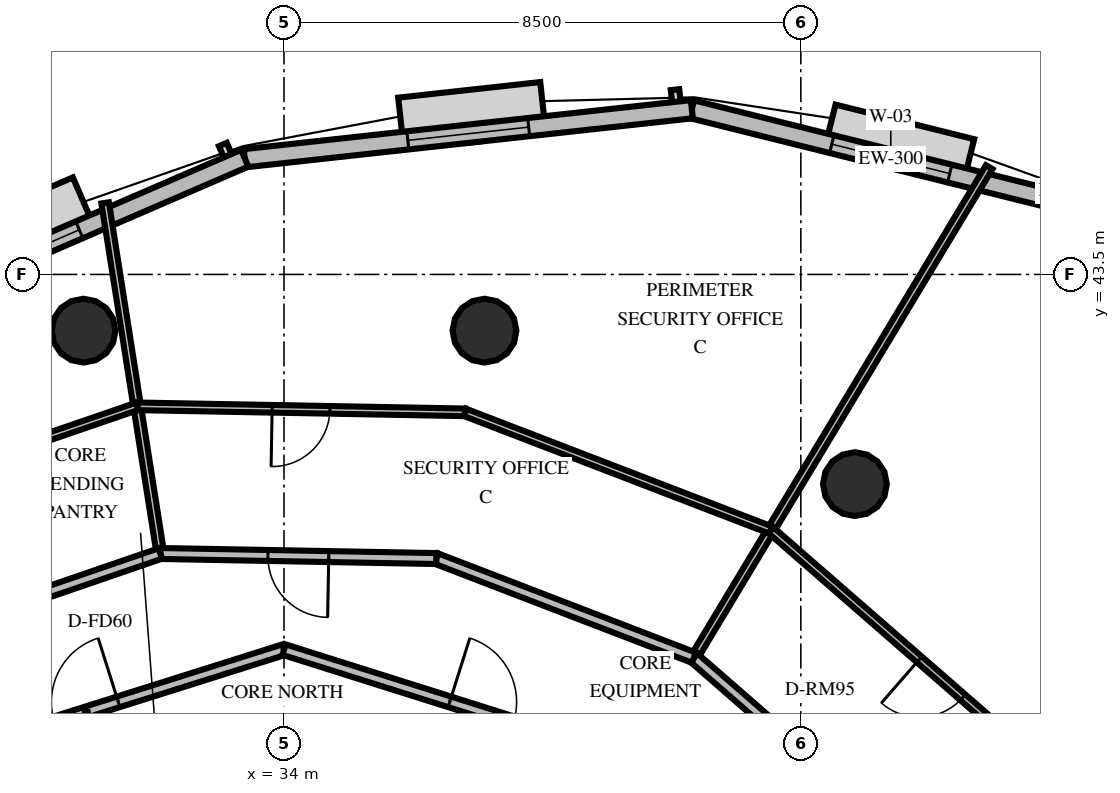
"""IFC4 building model, lengths in metres.
Left out: names, types, materials, properties, quantities, classifications, styles, units other than length and angle.
Written with IfcOpenShell. Run it as: python <this file> out.ifc"""

import sys

from ifc_helpers import new_model, si_unit, direction, frame, frame_2d, origin, origin_2d, place, context, subcontext, project, spatial, rectangle, circle, extrude, element, fill, save


model = new_model("IFC4")
c1 = context("Model", 3, precision=1e-05, world=origin(), true_north=direction((0.0, 1.0)))
c2 = subcontext(c1, "Body", "Model", "MODEL_VIEW")
j1 = project(units=[si_unit("LENGTHUNIT", "METRE"), si_unit("PLANEANGLEUNIT", "RADIAN")], contexts=[c1])
p1 = place(None, origin())
s1 = spatial("IfcSite", under=j1, at=p1, CompositionType="ELEMENT")
p2 = place(p1, origin())
s2 = spatial("IfcBuilding", under=s1, at=p2, CompositionType="ELEMENT")
p3 = place(p2, frame((0.0, 0.0, 195.2)))
s3 = spatial("IfcBuildingStorey", under=s2, at=p3, CompositionType="ELEMENT", Elevation=195.2)
for number, where, z_axis, x_axis in (
    (1, (43.389, 40.052, 0.0), (0.0, 0.0, 1.0), (1.0, 0.0, 0.0)),
    (2, (37.297, 42.575, 0.0), (0.0, 0.0, 1.0), (1.0, 0.0, 0.0)),
    (3, (30.703, 42.575, 0.0), (0.0, 0.0, 1.0), (1.0, 0.0, 0.0)),
):
    element("IfcColumn", number, at=place(p3, frame(where, z_axis=z_axis, x_axis=x_axis)), inside=s3, PredefinedType="COLUMN", context=c2, shape_type="SweptSolid", body=[
        extrude(circle(Radius=0.525, at=origin_2d()), origin(), (0.0, 0.0, 1.0), 3.6),
    ])
p4 = place(p3, frame((47.252, 44.584, 0.0), z_axis=(0.0, 0.0, 1.0), x_axis=(-0.970265866101, 0.242041626748, 0.0)))
e4 = element("IfcWall", 4, at=p4, inside=s3, PredefinedType="SOLIDWALL", context=c2, shape_type="SweptSolid", body=[
    extrude(rectangle(XDim=6.745, YDim=0.3, at=frame_2d((3.373, 0.0))), origin(), (0.0, 0.0, 1.0), 2.66),
])
p5 = place(p4, frame((2.373, 0.0, 0.8)))
e5 = element("IfcOpeningElement", 5, at=p5, cuts=e4, PredefinedType="OPENING", context=c2, shape_type="SweptSolid", body=[
    extrude(rectangle(XDim=2.0, YDim=1.85, at=frame_2d((1.0, 0.925))), frame((0.0, 0.16, 0.0), z_axis=(0.0, -1.0, 0.0), x_axis=(1.0, 0.0, 0.0)), (0.0, 0.0, 1.0), 0.32),
])
p6 = place(p3, frame((40.708, 46.217, 0.0), z_axis=(0.0, 0.0, 1.0), x_axis=(-0.994048036748, -0.108942648383, 0.0)))
e6 = element("IfcWall", 6, at=p6, inside=s3, PredefinedType="SOLIDWALL", context=c2, shape_type="SweptSolid", body=[
    extrude(rectangle(XDim=7.397, YDim=0.3, at=frame_2d((3.699, 0.0))), origin(), (0.0, 0.0, 1.0), 2.66),
])
p7 = place(p6, frame((2.699, 0.0, 0.8)))
e7 = element("IfcOpeningElement", 7, at=p7, cuts=e6, PredefinedType="OPENING", context=c2, shape_type="SweptSolid", body=[
    extrude(rectangle(XDim=2.0, YDim=1.85, at=frame_2d((1.0, 0.925))), frame((0.0, 0.16, 0.0), z_axis=(0.0, -1.0, 0.0), x_axis=(1.0, 0.0, 0.0)), (0.0, 0.0, 1.0), 0.32),
])
p8 = place(p3, frame((33.354, 45.411, 0.0), z_axis=(0.0, 0.0, 1.0), x_axis=(-0.917811240331, -0.397017036311, 0.0)))
e8 = element("IfcWall", 8, at=p8, inside=s3, PredefinedType="SOLIDWALL", context=c2, shape_type="SweptSolid", body=[
    extrude(rectangle(XDim=7.927, YDim=0.3, at=frame_2d((3.964, 0.0))), origin(), (0.0, 0.0, 1.0), 2.66),
])
p9 = place(p8, frame((2.964, 0.0, 0.8)))
e9 = element("IfcOpeningElement", 9, at=p9, cuts=e8, PredefinedType="OPENING", context=c2, shape_type="SweptSolid", body=[
    extrude(rectangle(XDim=2.0, YDim=1.85, at=frame_2d((1.0, 0.925))), frame((0.0, 0.16, 0.0), z_axis=(0.0, -1.0, 0.0), x_axis=(1.0, 0.0, 0.0)), (0.0, 0.0, 1.0), 0.32),
])
p10 = place(p3, frame((27.5, 35.28, 0.0), z_axis=(0.0, 0.0, 1.0), x_axis=(0.953691418528, 0.300786765376, 0.0)))
e10 = element("IfcWall", 10, at=p10, inside=s3, PredefinedType="PARTITIONING", context=c2, shape_type="SweptSolid", body=[
    extrude(rectangle(XDim=6.816, YDim=0.18, at=frame_2d((3.408, 0.0))), origin(), (0.0, 0.0, 1.0), 2.46),
])
p11 = place(p10, frame((2.858, 0.0, 0.0)))
e11 = element("IfcOpeningElement", 11, at=p11, cuts=e10, PredefinedType="OPENING", context=c2, shape_type="SweptSolid", body=[
    extrude(rectangle(XDim=1.1, YDim=2.15, at=frame_2d((0.55, 1.075))), frame((0.0, 0.1, 0.0), z_axis=(0.0, -1.0, 0.0), x_axis=(1.0, 0.0, 0.0)), (0.0, 0.0, 1.0), 0.2),
])
p12 = place(p3, frame((34.0, 37.33, 0.0), z_axis=(0.0, 0.0, 1.0), x_axis=(0.953691418528, -0.300786765376, 0.0)))
e12 = element("IfcWall", 12, at=p12, inside=s3, PredefinedType="PARTITIONING", context=c2, shape_type="SweptSolid", body=[
    extrude(rectangle(XDim=6.816, YDim=0.18, at=frame_2d((3.408, 0.0))), origin(), (0.0, 0.0, 1.0), 2.46),
])
p13 = place(p12, frame((2.858, 0.0, 0.0)))
e13 = element("IfcOpeningElement", 13, at=p13, cuts=e12, PredefinedType="OPENING", context=c2, shape_type="SweptSolid", body=[
    extrude(rectangle(XDim=1.1, YDim=2.15, at=frame_2d((0.55, 1.075))), frame((0.0, 0.1, 0.0), z_axis=(0.0, -1.0, 0.0), x_axis=(1.0, 0.0, 0.0)), (0.0, 0.0, 1.0), 0.2),
])
p14 = place(p3, frame((40.741, 37.197, 0.0), z_axis=(0.0, 0.0, 1.0), x_axis=(0.515795335876, 0.856711836903, 0.0)))
e14 = element("IfcWall", 14, at=p14, inside=s3, PredefinedType="PARTITIONING", context=c2, shape_type="SweptSolid", body=[
    extrude(rectangle(XDim=9.417, YDim=0.125, at=frame_2d((4.708, 0.0))), origin(), (0.0, 0.0, 1.0), 2.46),
])
p15 = place(p3, frame((44.165, 34.216, 0.0), z_axis=(0.0, 0.0, 1.0), x_axis=(-0.754153769573, 0.656697869525, 0.0)))
e15 = element("IfcWall", 15, at=p15, inside=s3, PredefinedType="PARTITIONING", context=c2, shape_type="SweptSolid", body=[
    extrude(rectangle(XDim=4.539, YDim=0.18, at=frame_2d((2.27, 0.0))), origin(), (0.0, 0.0, 1.0), 2.46),
])
p16 = place(p15, frame((0.96, 0.0, 0.0)))
e16 = element("IfcOpeningElement", 16, at=p16, cuts=e15, PredefinedType="OPENING", context=c2, shape_type="SweptSolid", body=[
    extrude(rectangle(XDim=1.0, YDim=2.15, at=frame_2d((0.5, 1.075))), frame((0.0, 0.1, 0.0), z_axis=(0.0, -1.0, 0.0), x_axis=(1.0, 0.0, 0.0)), (0.0, 0.0, 1.0), 0.2),
])
p17 = place(p3, frame((46.07, 35.757, 0.0), z_axis=(0.0, 0.0, 1.0), x_axis=(-0.754140206691, 0.656713444854, 0.0)))
e17 = element("IfcWall", 17, at=p17, inside=s3, PredefinedType="PARTITIONING", context=c2, shape_type="SweptSolid", body=[
    extrude(rectangle(XDim=5.39, YDim=0.125, at=frame_2d((2.695, 0.0))), origin(), (0.0, 0.0, 1.0), 2.46),
])
p18 = place(p17, frame((1.2, 0.0, 0.0)))
e18 = element("IfcOpeningElement", 18, at=p18, cuts=e17, PredefinedType="OPENING", context=c2, shape_type="SweptSolid", body=[
    extrude(rectangle(XDim=0.95, YDim=2.15, at=frame_2d((0.475, 1.075))), frame((0.0, 0.073, 0.0), z_axis=(0.0, -1.0, 0.0), x_axis=(1.0, 0.0, 0.0)), (0.0, 0.0, 1.0), 0.145),
])
p19 = place(p3, frame((31.967, 38.911, 0.0), z_axis=(0.0, 0.0, 1.0), x_axis=(-0.155588850642, 0.987821901739, 0.0)))
e19 = element("IfcWall", 19, at=p19, inside=s3, PredefinedType="PARTITIONING", context=c2, shape_type="SweptSolid", body=[
    extrude(rectangle(XDim=5.837, YDim=0.125, at=frame_2d((2.918, 0.0))), origin(), (0.0, 0.0, 1.0), 2.46),
])
p20 = place(p3, frame((40.741, 37.197, 0.0), z_axis=(0.0, 0.0, 1.0), x_axis=(-0.93326379198, 0.359191723984, 0.0)))
e20 = element("IfcWall", 20, at=p20, inside=s3, PredefinedType="PARTITIONING", context=c2, shape_type="SweptSolid", body=[
    extrude(rectangle(XDim=4.539, YDim=0.18, at=frame_2d((2.27, 0.0))), origin(), (0.0, 0.0, 1.0), 2.46),
])
p21 = place(p3, frame((36.505, 38.828, 0.0), z_axis=(0.0, 0.0, 1.0), x_axis=(-0.999831787945, 0.018341096331, 0.0)))
e21 = element("IfcWall", 21, at=p21, inside=s3, PredefinedType="PARTITIONING", context=c2, shape_type="SweptSolid", body=[
    extrude(rectangle(XDim=4.539, YDim=0.18, at=frame_2d((2.27, 0.0))), origin(), (0.0, 0.0, 1.0), 2.46),
])
p22 = place(p21, frame((1.77, 0.0, 0.0)))
e22 = element("IfcOpeningElement", 22, at=p22, cuts=e21, PredefinedType="OPENING", context=c2, shape_type="SweptSolid", body=[
    extrude(rectangle(XDim=1.0, YDim=2.15, at=frame_2d((0.5, 1.075))), frame((0.0, 0.1, 0.0), z_axis=(0.0, -1.0, 0.0), x_axis=(1.0, 0.0, 0.0)), (0.0, 0.0, 1.0), 0.2),
])
p23 = place(p3, frame((42.005, 39.296, 0.0), z_axis=(0.0, 0.0, 1.0), x_axis=(-0.933263863739, 0.359191537539, 0.0)))
e23 = element("IfcWall", 23, at=p23, inside=s3, PredefinedType="PARTITIONING", context=c2, shape_type="SweptSolid", body=[
    extrude(rectangle(XDim=5.39, YDim=0.125, at=frame_2d((2.695, 0.0))), origin(), (0.0, 0.0, 1.0), 2.46),
])
p24 = place(p3, frame((36.975, 41.232, 0.0), z_axis=(0.0, 0.0, 1.0), x_axis=(-0.999832559092, 0.018299010323, 0.0)))
e24 = element("IfcWall", 24, at=p24, inside=s3, PredefinedType="PARTITIONING", context=c2, shape_type="SweptSolid", body=[
    extrude(rectangle(XDim=5.39, YDim=0.125, at=frame_2d((2.695, 0.0))), origin(), (0.0, 0.0, 1.0), 2.46),
])
p25 = place(p24, frame((2.22, 0.0, 0.0)))
e25 = element("IfcOpeningElement", 25, at=p25, cuts=e24, PredefinedType="OPENING", context=c2, shape_type="SweptSolid", body=[
    extrude(rectangle(XDim=0.95, YDim=2.15, at=frame_2d((0.475, 1.075))), frame((0.0, 0.073, 0.0), z_axis=(0.0, -1.0, 0.0), x_axis=(1.0, 0.0, 0.0)), (0.0, 0.0, 1.0), 0.145),
])
p26 = place(p3, frame((31.967, 38.911, 0.0), z_axis=(0.0, 0.0, 1.0), x_axis=(-0.945799700753, -0.324750559747, 0.0)))
e26 = element("IfcWall", 26, at=p26, inside=s3, PredefinedType="PARTITIONING", context=c2, shape_type="SweptSolid", body=[
    extrude(rectangle(XDim=4.539, YDim=0.18, at=frame_2d((2.27, 0.0))), origin(), (0.0, 0.0, 1.0), 2.46),
])
p27 = place(p26, frame((2.579, 0.0, 0.0)))
e27 = element("IfcOpeningElement", 27, at=p27, cuts=e26, PredefinedType="OPENING", context=c2, shape_type="SweptSolid", body=[
    extrude(rectangle(XDim=1.0, YDim=2.15, at=frame_2d((0.5, 1.075))), frame((0.0, 0.1, 0.0), z_axis=(0.0, -1.0, 0.0), x_axis=(1.0, 0.0, 0.0)), (0.0, 0.0, 1.0), 0.2),
])
p28 = place(p3, frame((31.585, 41.331, 0.0), z_axis=(0.0, 0.0, 1.0), x_axis=(-0.945809679089, -0.324721497504, 0.0)))
e28 = element("IfcWall", 28, at=p28, inside=s3, PredefinedType="PARTITIONING", context=c2, shape_type="SweptSolid", body=[
    extrude(rectangle(XDim=5.39, YDim=0.125, at=frame_2d((2.695, 0.0))), origin(), (0.0, 0.0, 1.0), 2.46),
])
p29 = place(p28, frame((3.24, 0.0, 0.0)))
e29 = element("IfcOpeningElement", 29, at=p29, cuts=e28, PredefinedType="OPENING", context=c2, shape_type="SweptSolid", body=[
    extrude(rectangle(XDim=0.95, YDim=2.15, at=frame_2d((0.475, 1.075))), frame((0.0, 0.073, 0.0), z_axis=(0.0, -1.0, 0.0), x_axis=(1.0, 0.0, 0.0)), (0.0, 0.0, 1.0), 0.145),
])
p30 = place(p5, origin())
e30 = element("IfcWindow", 30, at=p30, inside=s3, PartitioningType="SINGLE_PANEL", PredefinedType="WINDOW", context=c2, shape_type="SweptSolid", body=[
    extrude(rectangle(XDim=2.0, YDim=1.85, at=frame_2d((1.0, 0.925))), frame((0.0, 0.03, 0.0), z_axis=(0.0, -1.0, 0.0), x_axis=(1.0, 0.0, 0.0)), (0.0, 0.0, 1.0), 0.06),
])
fill(e5, e30)
p31 = place(p7, origin())
e31 = element("IfcWindow", 31, at=p31, inside=s3, PartitioningType="SINGLE_PANEL", PredefinedType="WINDOW", context=c2, shape_type="SweptSolid", body=[
    extrude(rectangle(XDim=2.0, YDim=1.85, at=frame_2d((1.0, 0.925))), frame((0.0, 0.03, 0.0), z_axis=(0.0, -1.0, 0.0), x_axis=(1.0, 0.0, 0.0)), (0.0, 0.0, 1.0), 0.06),
])
fill(e7, e31)
p32 = place(p9, origin())
e32 = element("IfcWindow", 32, at=p32, inside=s3, PartitioningType="SINGLE_PANEL", PredefinedType="WINDOW", context=c2, shape_type="SweptSolid", body=[
    extrude(rectangle(XDim=2.0, YDim=1.85, at=frame_2d((1.0, 0.925))), frame((0.0, 0.03, 0.0), z_axis=(0.0, -1.0, 0.0), x_axis=(1.0, 0.0, 0.0)), (0.0, 0.0, 1.0), 0.06),
])
fill(e9, e32)
p33 = place(p11, origin())
e33 = element("IfcDoor", 33, at=p33, inside=s3, OperationType="SINGLE_SWING_RIGHT", PredefinedType="DOOR", context=c2, shape_type="SweptSolid", body=[
    extrude(rectangle(XDim=1.1, YDim=2.15, at=frame_2d((0.55, 1.075))), frame((0.0, 0.025, 0.0), z_axis=(0.0, -1.0, 0.0), x_axis=(1.0, 0.0, 0.0)), (0.0, 0.0, 1.0), 0.05),
])
fill(e11, e33)
p34 = place(p13, origin())
e34 = element("IfcDoor", 34, at=p34, inside=s3, OperationType="SINGLE_SWING_LEFT", PredefinedType="DOOR", context=c2, shape_type="SweptSolid", body=[
    extrude(rectangle(XDim=1.1, YDim=2.15, at=frame_2d((0.55, 1.075))), frame((0.0, 0.025, 0.0), z_axis=(0.0, -1.0, 0.0), x_axis=(1.0, 0.0, 0.0)), (0.0, 0.0, 1.0), 0.05),
])
fill(e13, e34)
p35 = place(p18, origin())
e35 = element("IfcDoor", 35, at=p35, inside=s3, OperationType="SINGLE_SWING_RIGHT", PredefinedType="DOOR", context=c2, shape_type="SweptSolid", body=[
    extrude(rectangle(XDim=0.95, YDim=2.15, at=frame_2d((0.475, 1.075))), frame((0.0, 0.025, 0.0), z_axis=(0.0, -1.0, 0.0), x_axis=(1.0, 0.0, 0.0)), (0.0, 0.0, 1.0), 0.05),
])
fill(e18, e35)
p36 = place(p22, origin())
e36 = element("IfcDoor", 36, at=p36, inside=s3, OperationType="SINGLE_SWING_LEFT", PredefinedType="DOOR", context=c2, shape_type="SweptSolid", body=[
    extrude(rectangle(XDim=1.0, YDim=2.15, at=frame_2d((0.5, 1.075))), frame((0.0, 0.025, 0.0), z_axis=(0.0, -1.0, 0.0), x_axis=(1.0, 0.0, 0.0)), (0.0, 0.0, 1.0), 0.05),
])
fill(e22, e36)
p37 = place(p25, origin())
e37 = element("IfcDoor", 37, at=p37, inside=s3, OperationType="SINGLE_SWING_RIGHT", PredefinedType="DOOR", context=c2, shape_type="SweptSolid", body=[
    extrude(rectangle(XDim=0.95, YDim=2.15, at=frame_2d((0.475, 1.075))), frame((0.0, 0.025, 0.0), z_axis=(0.0, -1.0, 0.0), x_axis=(1.0, 0.0, 0.0)), (0.0, 0.0, 1.0), 0.05),
])
fill(e25, e37)
save(model, sys.argv[1])
